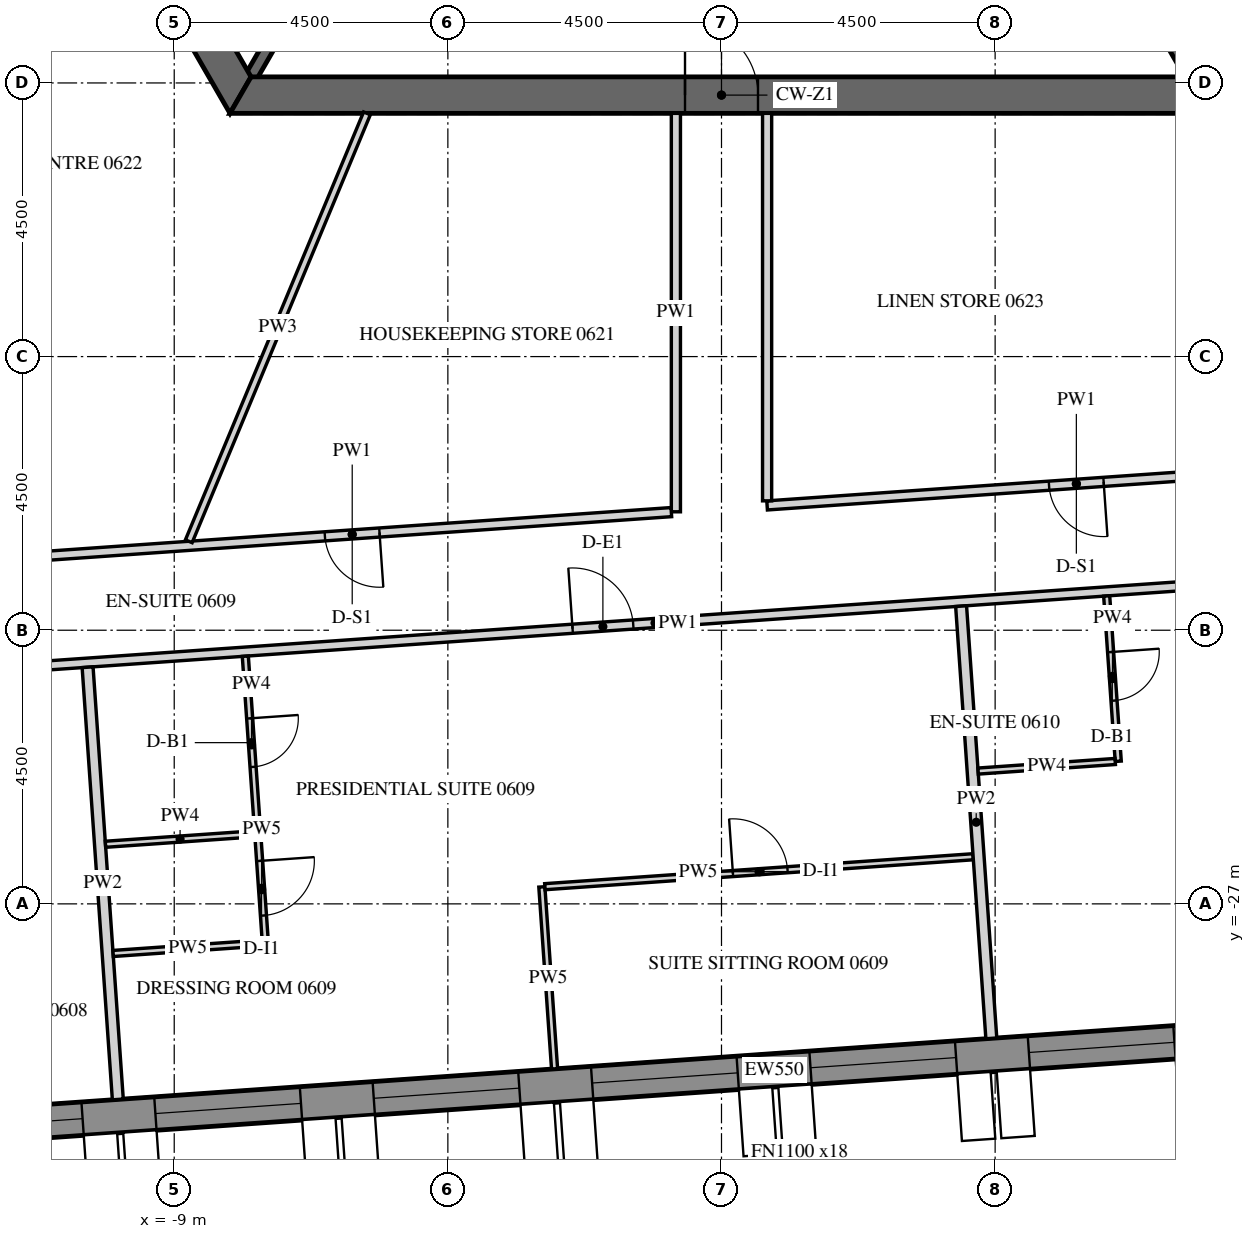
"""IFC4 building model, lengths in metres.
Left out: names, types, materials, properties, quantities, classifications, styles, units other than length and angle.
Written with IfcOpenShell. Run it as: python <this file> out.ifc"""

import sys

from ifc_helpers import new_model, si_unit, direction, frame, frame_2d, origin, place, context, subcontext, project, spatial, polyline, rectangle, outline, extrude, element, fill, save


model = new_model("IFC4")
c1 = context("Model", 3, precision=1e-05, world=origin(), true_north=direction((0.0, 1.0)))
c2 = subcontext(c1, "Body", "Model", "MODEL_VIEW")
j1 = project(units=[si_unit("LENGTHUNIT", "METRE"), si_unit("PLANEANGLEUNIT", "RADIAN")], contexts=[c1])
p1 = place(None, origin())
s1 = spatial("IfcSite", under=j1, at=p1, CompositionType="ELEMENT")
p2 = place(p1, origin())
s2 = spatial("IfcBuilding", under=s1, at=p2, CompositionType="ELEMENT")
p3 = place(p2, frame((0.0, 0.0, 92.1)))
s3 = spatial("IfcBuildingStorey", under=s2, at=p3, CompositionType="ELEMENT", Elevation=92.1)
p4 = place(p3, frame((-14.134, -30.786, -0.15), z_axis=(0.0, 0.0, 1.0), x_axis=(0.997564037441, 0.069756657061, 0.0)))
e1 = element("IfcWall", 1, at=p4, inside=s3, PredefinedType="SOLIDWALL", context=c2, shape_type="SweptSolid", body=[
    extrude(outline(polyline([(-0.026, -0.275), (30.094, -0.275), (30.049, 0.275), (0.026, 0.275), (-0.026, -0.275)])), origin(), (0.0, 0.0, 1.0), 3.9),
])
p5 = place(p4, frame((1.236, 0.0, 1.05)))
e2 = element("IfcOpeningElement", 2, at=p5, cuts=e1, PredefinedType="OPENING", context=c2, shape_type="SweptSolid", body=[
    extrude(rectangle(XDim=2.4, YDim=2.4, at=frame_2d((1.2, 1.2))), frame((0.0, 0.285, 0.0), z_axis=(0.0, -1.0, 0.0), x_axis=(1.0, 0.0, 0.0)), (0.0, 0.0, 1.0), 0.57),
])
p6 = place(p4, frame((4.835, 0.0, 1.05)))
e3 = element("IfcOpeningElement", 3, at=p6, cuts=e1, PredefinedType="OPENING", context=c2, shape_type="SweptSolid", body=[
    extrude(rectangle(XDim=2.4, YDim=2.4, at=frame_2d((1.2, 1.2))), frame((0.0, 0.285, 0.0), z_axis=(0.0, -1.0, 0.0), x_axis=(1.0, 0.0, 0.0)), (0.0, 0.0, 1.0), 0.57),
])
p7 = place(p4, frame((8.436, 0.0, 1.05)))
e4 = element("IfcOpeningElement", 4, at=p7, cuts=e1, PredefinedType="OPENING", context=c2, shape_type="SweptSolid", body=[
    extrude(rectangle(XDim=2.4, YDim=2.4, at=frame_2d((1.2, 1.2))), frame((0.0, 0.285, 0.0), z_axis=(0.0, -1.0, 0.0), x_axis=(1.0, 0.0, 0.0)), (0.0, 0.0, 1.0), 0.57),
])
p8 = place(p4, frame((12.035, 0.0, 1.05)))
e5 = element("IfcOpeningElement", 5, at=p8, cuts=e1, PredefinedType="OPENING", context=c2, shape_type="SweptSolid", body=[
    extrude(rectangle(XDim=2.4, YDim=2.4, at=frame_2d((1.2, 1.2))), frame((0.0, 0.285, 0.0), z_axis=(0.0, -1.0, 0.0), x_axis=(1.0, 0.0, 0.0)), (0.0, 0.0, 1.0), 0.57),
])
p9 = place(p4, frame((15.635, 0.0, 1.05)))
e6 = element("IfcOpeningElement", 6, at=p9, cuts=e1, PredefinedType="OPENING", context=c2, shape_type="SweptSolid", body=[
    extrude(rectangle(XDim=2.4, YDim=2.4, at=frame_2d((1.2, 1.2))), frame((0.0, 0.285, 0.0), z_axis=(0.0, -1.0, 0.0), x_axis=(1.0, 0.0, 0.0)), (0.0, 0.0, 1.0), 0.57),
])
p10 = place(p4, frame((19.236, 0.0, 1.05)))
e7 = element("IfcOpeningElement", 7, at=p10, cuts=e1, PredefinedType="OPENING", context=c2, shape_type="SweptSolid", body=[
    extrude(rectangle(XDim=2.4, YDim=2.4, at=frame_2d((1.2, 1.2))), frame((0.0, 0.285, 0.0), z_axis=(0.0, -1.0, 0.0), x_axis=(1.0, 0.0, 0.0)), (0.0, 0.0, 1.0), 0.57),
])
p11 = place(p4, frame((22.835, 0.0, 1.05)))
e8 = element("IfcOpeningElement", 8, at=p11, cuts=e1, PredefinedType="OPENING", context=c2, shape_type="SweptSolid", body=[
    extrude(rectangle(XDim=2.4, YDim=2.4, at=frame_2d((1.2, 1.2))), frame((0.0, 0.285, 0.0), z_axis=(0.0, -1.0, 0.0), x_axis=(1.0, 0.0, 0.0)), (0.0, 0.0, 1.0), 0.57),
])
p12 = place(p4, frame((26.436, 0.0, 1.05)))
e9 = element("IfcOpeningElement", 9, at=p12, cuts=e1, PredefinedType="OPENING", context=c2, shape_type="SweptSolid", body=[
    extrude(rectangle(XDim=2.4, YDim=2.4, at=frame_2d((1.2, 1.2))), frame((0.0, 0.285, 0.0), z_axis=(0.0, -1.0, 0.0), x_axis=(1.0, 0.0, 0.0)), (0.0, 0.0, 1.0), 0.57),
])
p13 = place(p3, frame((-15.819, 0.0, -0.15), z_axis=(0.0, 0.0, 1.0), x_axis=(0.499999880136, -0.866025472988, 0.0)))
e10 = element("IfcWall", 10, at=p13, inside=s3, PredefinedType="SHEAR", context=c2, shape_type="SweptSolid", body=[
    extrude(outline(polyline([(-0.173, -0.3), (15.993, -0.3), (15.646, 0.3), (0.173, 0.3), (-0.173, -0.3)])), origin(), (0.0, 0.0, 1.0), 3.9),
])
p14 = place(p13, frame((6.981, 0.0, 0.15)))
e11 = element("IfcOpeningElement", 11, at=p14, cuts=e10, PredefinedType="OPENING", context=c2, shape_type="SweptSolid", body=[
    extrude(rectangle(XDim=1.8, YDim=2.4, at=frame_2d((0.9, 1.2))), frame((0.0, 0.31, 0.0), z_axis=(0.0, -1.0, 0.0), x_axis=(1.0, 0.0, 0.0)), (0.0, 0.0, 1.0), 0.62),
])
p15 = place(p3, frame((-7.91, -13.7, -0.15), z_axis=(0.0, 0.0, 1.0), x_axis=(1.0, 0.0, 0.0)))
e12 = element("IfcWall", 12, at=p15, inside=s3, PredefinedType="SHEAR", context=c2, shape_type="SweptSolid", body=[
    extrude(outline(polyline([(-0.173, -0.3), (15.993, -0.3), (15.646, 0.3), (0.173, 0.3), (-0.173, -0.3)])), origin(), (0.0, 0.0, 1.0), 3.9),
])
p16 = place(p15, frame((7.31, 0.0, 0.15)))
e13 = element("IfcOpeningElement", 13, at=p16, cuts=e12, PredefinedType="OPENING", context=c2, shape_type="SweptSolid", body=[
    extrude(rectangle(XDim=1.2, YDim=2.4, at=frame_2d((0.6, 1.2))), frame((0.0, 0.31, 0.0), z_axis=(0.0, -1.0, 0.0), x_axis=(1.0, 0.0, 0.0)), (0.0, 0.0, 1.0), 0.62),
])
for number, where, z_axis, x_axis in (
    (14, (-5.773, -10.0, -0.15), (0.0, 0.0, 1.0), (-0.5, -0.866, 0.0)),
    (15, (5.773, -10.0, -0.15), (0.0, 0.0, 1.0), (0.5, -0.866, 0.0)),
):
    element("IfcWall", number, at=place(p3, frame(where, z_axis=z_axis, x_axis=x_axis)), inside=s3, PredefinedType="SHEAR", context=c2, shape_type="SweptSolid", body=[
        extrude(rectangle(XDim=3.926, YDim=0.2, at=frame_2d((1.963, 0.0))), origin(), (0.0, 0.0, 1.0), 3.9),
    ])
p17 = place(p3, frame((-12.234, -23.16, 0.0), z_axis=(0.0, 0.0, 1.0), x_axis=(0.997563845372, 0.069759403714, 0.0)))
e16 = element("IfcWall", 16, at=p17, inside=s3, PredefinedType="PARTITIONING", context=c2, shape_type="SweptSolid", body=[
    extrude(rectangle(XDim=22.335, YDim=0.15, at=frame_2d((11.168, 0.0))), origin(), (0.0, 0.0, 1.0), 2.988),
])
p18 = place(p17, frame((9.809, 0.0, 0.0)))
e17 = element("IfcOpeningElement", 17, at=p18, cuts=e16, PredefinedType="OPENING", context=c2, shape_type="SweptSolid", body=[
    extrude(rectangle(XDim=1.0, YDim=2.1, at=frame_2d((0.5, 1.05))), frame((0.0, 0.085, 0.0), z_axis=(0.0, -1.0, 0.0), x_axis=(1.0, 0.0, 0.0)), (0.0, 0.0, 1.0), 0.17),
])
p19 = place(p17, frame((19.972, 0.0, 0.0)))
e18 = element("IfcOpeningElement", 18, at=p19, cuts=e16, PredefinedType="OPENING", context=c2, shape_type="SweptSolid", body=[
    extrude(rectangle(XDim=1.0, YDim=2.1, at=frame_2d((0.5, 1.05))), frame((0.0, 0.085, 0.0), z_axis=(0.0, -1.0, 0.0), x_axis=(1.0, 0.0, 0.0)), (0.0, 0.0, 1.0), 0.17),
])
p20 = place(p3, frame((-0.75, -14.0, 0.0), z_axis=(0.0, 0.0, 1.0), x_axis=(0.0, -1.0, 0.0)))
e19 = element("IfcWall", 19, at=p20, inside=s3, PredefinedType="PARTITIONING", context=c2, shape_type="SweptSolid", body=[
    extrude(rectangle(XDim=6.552, YDim=0.15, at=frame_2d((3.276, 0.0))), origin(), (0.0, 0.0, 1.0), 2.988),
])
p21 = place(p3, frame((-0.825, -20.558, 0.0), z_axis=(0.0, 0.0, 1.0), x_axis=(-0.997564524135, -0.069749696677, 0.0)))
e20 = element("IfcWall", 20, at=p21, inside=s3, PredefinedType="PARTITIONING", context=c2, shape_type="SweptSolid", body=[
    extrude(rectangle(XDim=10.522, YDim=0.15, at=frame_2d((5.261, 0.0))), origin(), (0.0, 0.0, 1.0), 2.988),
])
p22 = place(p21, frame((4.811, 0.0, 0.0)))
e21 = element("IfcOpeningElement", 21, at=p22, cuts=e20, PredefinedType="OPENING", context=c2, shape_type="SweptSolid", body=[
    extrude(rectangle(XDim=0.9, YDim=2.1, at=frame_2d((0.45, 1.05))), frame((0.0, 0.085, 0.0), z_axis=(0.0, -1.0, 0.0), x_axis=(1.0, 0.0, 0.0)), (0.0, 0.0, 1.0), 0.17),
])
p23 = place(p3, frame((10.921, -19.736, 0.0), z_axis=(0.0, 0.0, 1.0), x_axis=(-0.997564418338, -0.069751209779, 0.0)))
e22 = element("IfcWall", 22, at=p23, inside=s3, PredefinedType="PARTITIONING", context=c2, shape_type="SweptSolid", body=[
    extrude(rectangle(XDim=10.196, YDim=0.15, at=frame_2d((5.098, 0.0))), origin(), (0.0, 0.0, 1.0), 2.988),
])
p24 = place(p23, frame((4.648, 0.0, 0.0)))
e23 = element("IfcOpeningElement", 23, at=p24, cuts=e22, PredefinedType="OPENING", context=c2, shape_type="SweptSolid", body=[
    extrude(rectangle(XDim=0.9, YDim=2.1, at=frame_2d((0.45, 1.05))), frame((0.0, 0.085, 0.0), z_axis=(0.0, -1.0, 0.0), x_axis=(1.0, 0.0, 0.0)), (0.0, 0.0, 1.0), 0.17),
])
p25 = place(p3, frame((0.75, -20.372, 0.0), z_axis=(0.0, 0.0, 1.0), x_axis=(0.0, 1.0, 0.0)))
e24 = element("IfcWall", 24, at=p25, inside=s3, PredefinedType="PARTITIONING", context=c2, shape_type="SweptSolid", body=[
    extrude(rectangle(XDim=6.372, YDim=0.15, at=frame_2d((3.186, 0.0))), origin(), (0.0, 0.0, 1.0), 2.988),
])
p26 = place(p3, frame((-9.927, -30.216, 0.0), z_axis=(0.0, 0.0, 1.0), x_axis=(-0.069764000094, 0.997563523938, 0.0)))
e25 = element("IfcWall", 25, at=p26, inside=s3, PredefinedType="PARTITIONING", context=c2, shape_type="SweptSolid", body=[
    extrude(rectangle(XDim=7.125, YDim=0.18, at=frame_2d((3.562, 0.0))), origin(), (0.0, 0.0, 1.0), 2.988),
])
p27 = place(p3, frame((-7.831, -22.927, 0.0), z_axis=(0.0, 0.0, 1.0), x_axis=(0.069775971057, -0.997562686683, 0.0)))
e26 = element("IfcWall", 26, at=p27, inside=s3, PredefinedType="PARTITIONING", context=c2, shape_type="SweptSolid", body=[
    extrude(rectangle(XDim=2.925, YDim=0.1, at=frame_2d((1.462, 0.0))), origin(), (0.0, 0.0, 1.0), 2.988),
])
p28 = place(p27, frame((1.025, 0.0, 0.0)))
e27 = element("IfcOpeningElement", 27, at=p28, cuts=e26, PredefinedType="OPENING", context=c2, shape_type="SweptSolid", body=[
    extrude(rectangle(XDim=0.8, YDim=2.1, at=frame_2d((0.4, 1.05))), frame((0.0, 0.06, 0.0), z_axis=(0.0, -1.0, 0.0), x_axis=(1.0, 0.0, 0.0)), (0.0, 0.0, 1.0), 0.12),
])
p29 = place(p3, frame((-7.623, -25.895, 0.0), z_axis=(0.0, 0.0, 1.0), x_axis=(0.069750000204, -0.997564502913, 0.0)))
e28 = element("IfcWall", 28, at=p29, inside=s3, PredefinedType="PARTITIONING", context=c2, shape_type="SweptSolid", body=[
    extrude(rectangle(XDim=1.75, YDim=0.1, at=frame_2d((0.875, 0.0))), origin(), (0.0, 0.0, 1.0), 2.988),
])
p30 = place(p29, frame((0.4, 0.0, 0.0)))
e29 = element("IfcOpeningElement", 29, at=p30, cuts=e28, PredefinedType="OPENING", context=c2, shape_type="SweptSolid", body=[
    extrude(rectangle(XDim=0.9, YDim=2.1, at=frame_2d((0.45, 1.05))), frame((0.0, 0.06, 0.0), z_axis=(0.0, -1.0, 0.0), x_axis=(1.0, 0.0, 0.0)), (0.0, 0.0, 1.0), 0.12),
])
p31 = place(p3, frame((-7.551, -27.644, 0.0), z_axis=(0.0, 0.0, 1.0), x_axis=(-0.997563389425, -0.069765923475, 0.0)))
e30 = element("IfcWall", 30, at=p31, inside=s3, PredefinedType="PARTITIONING", context=c2, shape_type="SweptSolid", body=[
    extrude(rectangle(XDim=2.46, YDim=0.1, at=frame_2d((1.23, 0.0))), origin(), (0.0, 0.0, 1.0), 2.988),
])
p32 = place(p3, frame((-2.745, -29.714, 0.0), z_axis=(0.0, 0.0, 1.0), x_axis=(-0.069743284499, 0.997564972454, 0.0)))
e31 = element("IfcWall", 31, at=p32, inside=s3, PredefinedType="PARTITIONING", context=c2, shape_type="SweptSolid", body=[
    extrude(rectangle(XDim=3.0, YDim=0.1, at=frame_2d((1.5, 0.0))), origin(), (0.0, 0.0, 1.0), 2.988),
])
p33 = place(p3, frame((-2.905, -26.718, 0.0), z_axis=(0.0, 0.0, 1.0), x_axis=(0.997562242002, 0.069782328216, 0.0)))
e32 = element("IfcWall", 32, at=p33, inside=s3, PredefinedType="PARTITIONING", context=c2, shape_type="SweptSolid", body=[
    extrude(rectangle(XDim=7.06, YDim=0.1, at=frame_2d((3.53, 0.0))), origin(), (0.0, 0.0, 1.0), 2.988),
])
p34 = place(p33, frame((3.1, 0.0, 0.0)))
e33 = element("IfcOpeningElement", 33, at=p34, cuts=e32, PredefinedType="OPENING", context=c2, shape_type="SweptSolid", body=[
    extrude(rectangle(XDim=0.9, YDim=2.1, at=frame_2d((0.45, 1.05))), frame((0.0, 0.06, 0.0), z_axis=(0.0, -1.0, 0.0), x_axis=(1.0, 0.0, 0.0)), (0.0, 0.0, 1.0), 0.12),
])
p35 = place(p3, frame((4.438, -29.212, 0.0), z_axis=(0.0, 0.0, 1.0), x_axis=(-0.069764000094, 0.997563523938, 0.0)))
e34 = element("IfcWall", 34, at=p35, inside=s3, PredefinedType="PARTITIONING", context=c2, shape_type="SweptSolid", body=[
    extrude(rectangle(XDim=7.125, YDim=0.18, at=frame_2d((3.562, 0.0))), origin(), (0.0, 0.0, 1.0), 2.988),
])
p36 = place(p3, frame((-10.131, -26.02, 0.0), z_axis=(0.0, 0.0, 1.0), x_axis=(0.997562906323, 0.069772830877, 0.0)))
e35 = element("IfcWall", 35, at=p36, inside=s3, PredefinedType="PARTITIONING", context=c2, shape_type="SweptSolid", body=[
    extrude(rectangle(XDim=2.46, YDim=0.1, at=frame_2d((1.23, 0.0))), origin(), (0.0, 0.0, 1.0), 2.988),
])
p37 = place(p3, frame((6.334, -21.937, 0.0), z_axis=(0.0, 0.0, 1.0), x_axis=(0.069789009646, -0.997561774595, 0.0)))
e36 = element("IfcWall", 36, at=p37, inside=s3, PredefinedType="PARTITIONING", context=c2, shape_type="SweptSolid", body=[
    extrude(rectangle(XDim=2.725, YDim=0.1, at=frame_2d((1.363, 0.0))), origin(), (0.0, 0.0, 1.0), 2.988),
])
p38 = place(p37, frame((0.925, 0.0, 0.0)))
e37 = element("IfcOpeningElement", 37, at=p38, cuts=e36, PredefinedType="OPENING", context=c2, shape_type="SweptSolid", body=[
    extrude(rectangle(XDim=0.8, YDim=2.1, at=frame_2d((0.4, 1.05))), frame((0.0, 0.06, 0.0), z_axis=(0.0, -1.0, 0.0), x_axis=(1.0, 0.0, 0.0)), (0.0, 0.0, 1.0), 0.12),
])
p39 = place(p3, frame((6.475, -24.658, 0.0), z_axis=(0.0, 0.0, 1.0), x_axis=(-0.997562351999, -0.069780755754, 0.0)))
e38 = element("IfcWall", 38, at=p39, inside=s3, PredefinedType="PARTITIONING", context=c2, shape_type="SweptSolid", body=[
    extrude(rectangle(XDim=2.26, YDim=0.1, at=frame_2d((1.13, 0.0))), origin(), (0.0, 0.0, 1.0), 2.988),
])
p40 = place(p3, frame((-5.83, -14.0, 0.0), z_axis=(0.0, 0.0, 1.0), x_axis=(-0.384440276883, -0.923149865141, 0.0)))
e39 = element("IfcWall", 39, at=p40, inside=s3, PredefinedType="PARTITIONING", context=c2, shape_type="SweptSolid", body=[
    extrude(rectangle(XDim=7.623, YDim=0.12, at=frame_2d((3.812, 0.0))), origin(), (0.0, 0.0, 1.0), 2.988),
])
p41 = place(p5, frame((0.0, 0.205, 0.0)))
e40 = element("IfcWindow", 40, at=p41, inside=s3, PartitioningType="DOUBLE_PANEL_VERTICAL", PredefinedType="WINDOW", context=c2, shape_type="SweptSolid", body=[
    extrude(rectangle(XDim=2.4, YDim=2.4, at=frame_2d((1.2, 1.2))), frame((0.0, 0.03, 0.0), z_axis=(0.0, -1.0, 0.0), x_axis=(1.0, 0.0, 0.0)), (0.0, 0.0, 1.0), 0.06),
])
fill(e2, e40)
p42 = place(p6, frame((0.0, 0.205, 0.0)))
e41 = element("IfcWindow", 41, at=p42, inside=s3, PartitioningType="DOUBLE_PANEL_VERTICAL", PredefinedType="WINDOW", context=c2, shape_type="SweptSolid", body=[
    extrude(rectangle(XDim=2.4, YDim=2.4, at=frame_2d((1.2, 1.2))), frame((0.0, 0.03, 0.0), z_axis=(0.0, -1.0, 0.0), x_axis=(1.0, 0.0, 0.0)), (0.0, 0.0, 1.0), 0.06),
])
fill(e3, e41)
p43 = place(p7, frame((0.0, 0.205, 0.0)))
e42 = element("IfcWindow", 42, at=p43, inside=s3, PartitioningType="DOUBLE_PANEL_VERTICAL", PredefinedType="WINDOW", context=c2, shape_type="SweptSolid", body=[
    extrude(rectangle(XDim=2.4, YDim=2.4, at=frame_2d((1.2, 1.2))), frame((0.0, 0.03, 0.0), z_axis=(0.0, -1.0, 0.0), x_axis=(1.0, 0.0, 0.0)), (0.0, 0.0, 1.0), 0.06),
])
fill(e4, e42)
p44 = place(p8, frame((0.0, 0.205, 0.0)))
e43 = element("IfcWindow", 43, at=p44, inside=s3, PartitioningType="DOUBLE_PANEL_VERTICAL", PredefinedType="WINDOW", context=c2, shape_type="SweptSolid", body=[
    extrude(rectangle(XDim=2.4, YDim=2.4, at=frame_2d((1.2, 1.2))), frame((0.0, 0.03, 0.0), z_axis=(0.0, -1.0, 0.0), x_axis=(1.0, 0.0, 0.0)), (0.0, 0.0, 1.0), 0.06),
])
fill(e5, e43)
p45 = place(p9, frame((0.0, 0.205, 0.0)))
e44 = element("IfcWindow", 44, at=p45, inside=s3, PartitioningType="DOUBLE_PANEL_VERTICAL", PredefinedType="WINDOW", context=c2, shape_type="SweptSolid", body=[
    extrude(rectangle(XDim=2.4, YDim=2.4, at=frame_2d((1.2, 1.2))), frame((0.0, 0.03, 0.0), z_axis=(0.0, -1.0, 0.0), x_axis=(1.0, 0.0, 0.0)), (0.0, 0.0, 1.0), 0.06),
])
fill(e6, e44)
p46 = place(p10, frame((0.0, 0.205, 0.0)))
e45 = element("IfcWindow", 45, at=p46, inside=s3, PartitioningType="DOUBLE_PANEL_VERTICAL", PredefinedType="WINDOW", context=c2, shape_type="SweptSolid", body=[
    extrude(rectangle(XDim=2.4, YDim=2.4, at=frame_2d((1.2, 1.2))), frame((0.0, 0.03, 0.0), z_axis=(0.0, -1.0, 0.0), x_axis=(1.0, 0.0, 0.0)), (0.0, 0.0, 1.0), 0.06),
])
fill(e7, e45)
p47 = place(p16, origin())
e46 = element("IfcDoor", 46, at=p47, inside=s3, OperationType="SINGLE_SWING_LEFT", PredefinedType="DOOR", context=c2, shape_type="SweptSolid", body=[
    extrude(rectangle(XDim=1.2, YDim=2.4, at=frame_2d((0.6, 1.2))), frame((0.0, 0.025, 0.0), z_axis=(0.0, -1.0, 0.0), x_axis=(1.0, 0.0, 0.0)), (0.0, 0.0, 1.0), 0.05),
])
fill(e13, e46)
p48 = place(p18, origin())
e47 = element("IfcDoor", 47, at=p48, inside=s3, OperationType="SINGLE_SWING_RIGHT", PredefinedType="DOOR", context=c2, shape_type="SweptSolid", body=[
    extrude(rectangle(XDim=1.0, YDim=2.1, at=frame_2d((0.5, 1.05))), frame((0.0, 0.025, 0.0), z_axis=(0.0, -1.0, 0.0), x_axis=(1.0, 0.0, 0.0)), (0.0, 0.0, 1.0), 0.05),
])
fill(e17, e47)
p49 = place(p28, origin())
e48 = element("IfcDoor", 48, at=p49, inside=s3, OperationType="SINGLE_SWING_RIGHT", PredefinedType="DOOR", context=c2, shape_type="SweptSolid", body=[
    extrude(rectangle(XDim=0.8, YDim=2.1, at=frame_2d((0.4, 1.05))), frame((0.0, 0.025, 0.0), z_axis=(0.0, -1.0, 0.0), x_axis=(1.0, 0.0, 0.0)), (0.0, 0.0, 1.0), 0.05),
])
fill(e27, e48)
p50 = place(p30, origin())
e49 = element("IfcDoor", 49, at=p50, inside=s3, OperationType="SINGLE_SWING_RIGHT", PredefinedType="DOOR", context=c2, shape_type="SweptSolid", body=[
    extrude(rectangle(XDim=0.9, YDim=2.1, at=frame_2d((0.45, 1.05))), frame((0.0, 0.025, 0.0), z_axis=(0.0, -1.0, 0.0), x_axis=(1.0, 0.0, 0.0)), (0.0, 0.0, 1.0), 0.05),
])
fill(e29, e49)
p51 = place(p34, origin())
e50 = element("IfcDoor", 50, at=p51, inside=s3, OperationType="SINGLE_SWING_RIGHT", PredefinedType="DOOR", context=c2, shape_type="SweptSolid", body=[
    extrude(rectangle(XDim=0.9, YDim=2.1, at=frame_2d((0.45, 1.05))), frame((0.0, 0.025, 0.0), z_axis=(0.0, -1.0, 0.0), x_axis=(1.0, 0.0, 0.0)), (0.0, 0.0, 1.0), 0.05),
])
fill(e33, e50)
p52 = place(p38, origin())
e51 = element("IfcDoor", 51, at=p52, inside=s3, OperationType="SINGLE_SWING_RIGHT", PredefinedType="DOOR", context=c2, shape_type="SweptSolid", body=[
    extrude(rectangle(XDim=0.8, YDim=2.1, at=frame_2d((0.4, 1.05))), frame((0.0, 0.025, 0.0), z_axis=(0.0, -1.0, 0.0), x_axis=(1.0, 0.0, 0.0)), (0.0, 0.0, 1.0), 0.05),
])
fill(e37, e51)
p53 = place(p22, origin())
e52 = element("IfcDoor", 52, at=p53, inside=s3, OperationType="SINGLE_SWING_LEFT", PredefinedType="DOOR", context=c2, shape_type="SweptSolid", body=[
    extrude(rectangle(XDim=0.9, YDim=2.1, at=frame_2d((0.45, 1.05))), frame((0.0, 0.025, 0.0), z_axis=(0.0, -1.0, 0.0), x_axis=(1.0, 0.0, 0.0)), (0.0, 0.0, 1.0), 0.05),
])
fill(e21, e52)
p54 = place(p24, origin())
e53 = element("IfcDoor", 53, at=p54, inside=s3, OperationType="SINGLE_SWING_LEFT", PredefinedType="DOOR", context=c2, shape_type="SweptSolid", body=[
    extrude(rectangle(XDim=0.9, YDim=2.1, at=frame_2d((0.45, 1.05))), frame((0.0, 0.025, 0.0), z_axis=(0.0, -1.0, 0.0), x_axis=(1.0, 0.0, 0.0)), (0.0, 0.0, 1.0), 0.05),
])
fill(e23, e53)
save(model, sys.argv[1])
